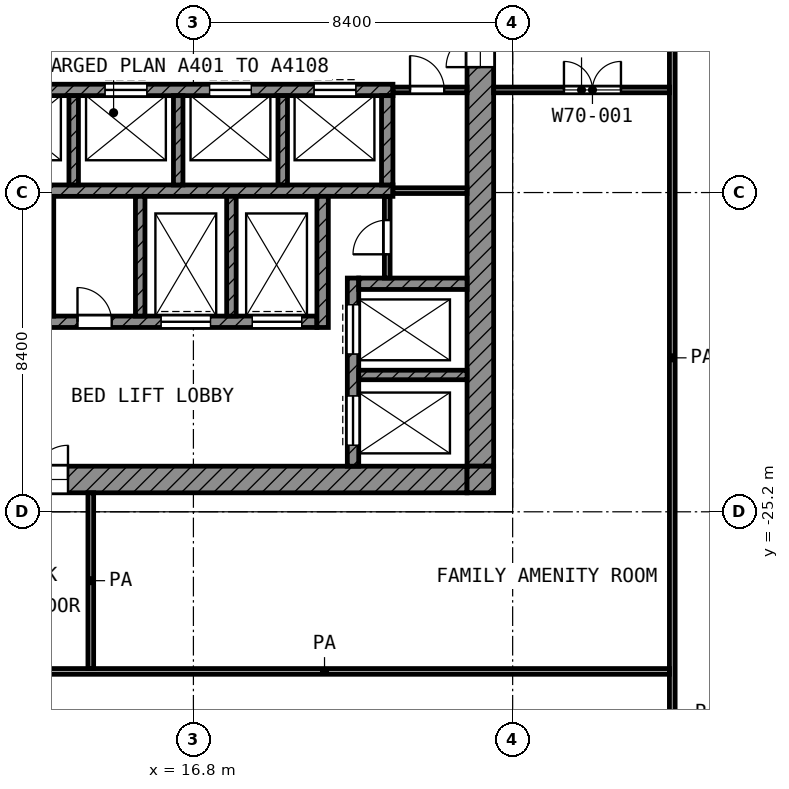
"""IFC4 building model, lengths in metres.
Left out: names, types, materials, properties, quantities, classifications, styles, units other than length and angle.
Written with IfcOpenShell. Run it as: python <this file> out.ifc"""

import sys

from ifc_helpers import new_model, si_unit, direction, frame, frame_2d, origin, place, context, subcontext, project, spatial, rectangle, extrude, element, fill, save


model = new_model("IFC4")
c1 = context("Model", 3, precision=1e-05, world=origin(), true_north=direction((0.0, 1.0)))
c2 = subcontext(c1, "Body", "Model", "MODEL_VIEW")
j1 = project(units=[si_unit("LENGTHUNIT", "METRE"), si_unit("PLANEANGLEUNIT", "RADIAN")], contexts=[c1])
p1 = place(None, origin())
s1 = spatial("IfcSite", under=j1, at=p1, CompositionType="ELEMENT")
p2 = place(p1, origin())
s2 = spatial("IfcBuilding", under=s1, at=p2, CompositionType="ELEMENT")
p3 = place(p2, frame((0.0, 0.0, 323.8)))
s3 = spatial("IfcBuildingStorey", under=s2, at=p3, CompositionType="ELEMENT", Elevation=323.8)
p4 = place(p3, frame((24.35, -24.0, 0.0), z_axis=(0.0, 0.0, 1.0), x_axis=(0.0, 1.0, 0.0)))
e1 = element("IfcWall", 1, at=p4, inside=s3, PredefinedType="SHEAR", context=c2, shape_type="SweptSolid", body=[
    extrude(rectangle(XDim=18.6, YDim=0.7, at=frame_2d((9.3, 0.0))), origin(), (0.0, 0.0, 1.0), 3.6),
])
p5 = place(p4, frame((10.5, 0.0, 0.0)))
e2 = element("IfcOpeningElement", 2, at=p5, cuts=e1, PredefinedType="OPENING", context=c2, shape_type="SweptSolid", body=[
    extrude(rectangle(XDim=1.8, YDim=2.1, at=frame_2d((0.9, 1.05))), frame((0.0, 0.36, 0.0), z_axis=(0.0, -1.0, 0.0), x_axis=(1.0, 0.0, 0.0)), (0.0, 0.0, 1.0), 0.72),
])
p6 = place(p3, frame((5.4, -24.35, 0.0), z_axis=(0.0, 0.0, 1.0), x_axis=(1.0, 0.0, 0.0)))
e3 = element("IfcWall", 3, at=p6, inside=s3, PredefinedType="SHEAR", context=c2, shape_type="SweptSolid", body=[
    extrude(rectangle(XDim=18.6, YDim=0.7, at=frame_2d((9.3, 0.0))), origin(), (0.0, 0.0, 1.0), 3.6),
])
p7 = place(p6, frame((6.3, 0.0, 0.0)))
e4 = element("IfcOpeningElement", 4, at=p7, cuts=e3, PredefinedType="OPENING", context=c2, shape_type="SweptSolid", body=[
    extrude(rectangle(XDim=1.8, YDim=2.1, at=frame_2d((0.9, 1.05))), frame((0.0, 0.36, 0.0), z_axis=(0.0, -1.0, 0.0), x_axis=(1.0, 0.0, 0.0)), (0.0, 0.0, 1.0), 0.72),
])
p8 = place(p3, frame((24.35, -24.7, 0.0), z_axis=(0.0, 0.0, 1.0), x_axis=(0.0, 1.0, 0.0)))
e5 = element("IfcWall", 5, at=p8, inside=s3, PredefinedType="SHEAR", context=c2, shape_type="SweptSolid", body=[
    extrude(rectangle(XDim=0.7, YDim=0.7, at=frame_2d((0.35, 0.0))), origin(), (0.0, 0.0, 1.0), 3.6),
])
p9 = place(p3, frame((5.4, -14.1, 0.0), z_axis=(0.0, 0.0, 1.0), x_axis=(1.0, 0.0, 0.0)))
e6 = element("IfcWall", 6, at=p9, inside=s3, PredefinedType="SHEAR", context=c2, shape_type="SweptSolid", body=[
    extrude(rectangle(XDim=16.65, YDim=0.3, at=frame_2d((8.325, 0.0))), origin(), (0.0, 0.0, 1.0), 3.6),
])
p10 = place(p9, frame((6.325, 0.0, 0.0)))
e7 = element("IfcOpeningElement", 7, at=p10, cuts=e6, PredefinedType="OPENING", context=c2, shape_type="SweptSolid", body=[
    extrude(rectangle(XDim=1.1, YDim=2.1, at=frame_2d((0.55, 1.05))), frame((0.0, 0.16, 0.0), z_axis=(0.0, -1.0, 0.0), x_axis=(1.0, 0.0, 0.0)), (0.0, 0.0, 1.0), 0.32),
])
p11 = place(p9, frame((9.075, 0.0, 0.0)))
e8 = element("IfcOpeningElement", 8, at=p11, cuts=e6, PredefinedType="OPENING", context=c2, shape_type="SweptSolid", body=[
    extrude(rectangle(XDim=1.1, YDim=2.1, at=frame_2d((0.55, 1.05))), frame((0.0, 0.16, 0.0), z_axis=(0.0, -1.0, 0.0), x_axis=(1.0, 0.0, 0.0)), (0.0, 0.0, 1.0), 0.32),
])
p12 = place(p9, frame((11.825, 0.0, 0.0)))
e9 = element("IfcOpeningElement", 9, at=p12, cuts=e6, PredefinedType="OPENING", context=c2, shape_type="SweptSolid", body=[
    extrude(rectangle(XDim=1.1, YDim=2.1, at=frame_2d((0.55, 1.05))), frame((0.0, 0.16, 0.0), z_axis=(0.0, -1.0, 0.0), x_axis=(1.0, 0.0, 0.0)), (0.0, 0.0, 1.0), 0.32),
])
p13 = place(p9, frame((14.575, 0.0, 0.0)))
e10 = element("IfcOpeningElement", 10, at=p13, cuts=e6, PredefinedType="OPENING", context=c2, shape_type="SweptSolid", body=[
    extrude(rectangle(XDim=1.1, YDim=2.1, at=frame_2d((0.55, 1.05))), frame((0.0, 0.16, 0.0), z_axis=(0.0, -1.0, 0.0), x_axis=(1.0, 0.0, 0.0)), (0.0, 0.0, 1.0), 0.32),
])
p14 = place(p9, frame((2.3, 0.0, 0.0)))
e11 = element("IfcOpeningElement", 11, at=p14, cuts=e6, PredefinedType="OPENING", context=c2, shape_type="SweptSolid", body=[
    extrude(rectangle(XDim=0.9, YDim=2.1, at=frame_2d((0.45, 1.05))), frame((0.0, 0.16, 0.0), z_axis=(0.0, -1.0, 0.0), x_axis=(1.0, 0.0, 0.0)), (0.0, 0.0, 1.0), 0.32),
])
p15 = place(p3, frame((5.4, -16.75, 0.0), z_axis=(0.0, 0.0, 1.0), x_axis=(1.0, 0.0, 0.0)))
e12 = element("IfcWall", 12, at=p15, inside=s3, PredefinedType="SHEAR", context=c2, shape_type="SweptSolid", body=[
    extrude(rectangle(XDim=16.65, YDim=0.3, at=frame_2d((8.325, 0.0))), origin(), (0.0, 0.0, 1.0), 3.6),
])
p16 = place(p3, frame((5.4, -20.2, 0.0), z_axis=(0.0, 0.0, 1.0), x_axis=(1.0, 0.0, 0.0)))
e13 = element("IfcWall", 13, at=p16, inside=s3, PredefinedType="SHEAR", context=c2, shape_type="SweptSolid", body=[
    extrude(rectangle(XDim=14.65, YDim=0.3, at=frame_2d((7.325, 0.0))), origin(), (0.0, 0.0, 1.0), 3.6),
])
p17 = place(p16, frame((10.55, 0.0, 0.0)))
e14 = element("IfcOpeningElement", 14, at=p17, cuts=e13, PredefinedType="OPENING", context=c2, shape_type="SweptSolid", body=[
    extrude(rectangle(XDim=1.3, YDim=2.1, at=frame_2d((0.65, 1.05))), frame((0.0, 0.16, 0.0), z_axis=(0.0, -1.0, 0.0), x_axis=(1.0, 0.0, 0.0)), (0.0, 0.0, 1.0), 0.32),
])
p18 = place(p16, frame((12.95, 0.0, 0.0)))
e15 = element("IfcOpeningElement", 15, at=p18, cuts=e13, PredefinedType="OPENING", context=c2, shape_type="SweptSolid", body=[
    extrude(rectangle(XDim=1.3, YDim=2.1, at=frame_2d((0.65, 1.05))), frame((0.0, 0.16, 0.0), z_axis=(0.0, -1.0, 0.0), x_axis=(1.0, 0.0, 0.0)), (0.0, 0.0, 1.0), 0.32),
])
p19 = place(p16, frame((0.55, 0.0, 0.0)))
e16 = element("IfcOpeningElement", 16, at=p19, cuts=e13, PredefinedType="OPENING", context=c2, shape_type="SweptSolid", body=[
    extrude(rectangle(XDim=1.3, YDim=2.1, at=frame_2d((0.65, 1.05))), frame((0.0, 0.16, 0.0), z_axis=(0.0, -1.0, 0.0), x_axis=(1.0, 0.0, 0.0)), (0.0, 0.0, 1.0), 0.32),
])
p20 = place(p16, frame((2.95, 0.0, 0.0)))
e17 = element("IfcOpeningElement", 17, at=p20, cuts=e13, PredefinedType="OPENING", context=c2, shape_type="SweptSolid", body=[
    extrude(rectangle(XDim=1.3, YDim=2.1, at=frame_2d((0.65, 1.05))), frame((0.0, 0.16, 0.0), z_axis=(0.0, -1.0, 0.0), x_axis=(1.0, 0.0, 0.0)), (0.0, 0.0, 1.0), 0.32),
])
p21 = place(p16, frame((5.95, 0.0, 0.0)))
e18 = element("IfcOpeningElement", 18, at=p21, cuts=e13, PredefinedType="OPENING", context=c2, shape_type="SweptSolid", body=[
    extrude(rectangle(XDim=0.9, YDim=2.1, at=frame_2d((0.45, 1.05))), frame((0.0, 0.16, 0.0), z_axis=(0.0, -1.0, 0.0), x_axis=(1.0, 0.0, 0.0)), (0.0, 0.0, 1.0), 0.32),
])
p22 = place(p16, frame((8.35, 0.0, 0.0)))
e19 = element("IfcOpeningElement", 19, at=p22, cuts=e13, PredefinedType="OPENING", context=c2, shape_type="SweptSolid", body=[
    extrude(rectangle(XDim=0.9, YDim=2.1, at=frame_2d((0.45, 1.05))), frame((0.0, 0.16, 0.0), z_axis=(0.0, -1.0, 0.0), x_axis=(1.0, 0.0, 0.0)), (0.0, 0.0, 1.0), 0.32),
])
p23 = place(p3, frame((20.2, -20.35, 0.0), z_axis=(0.0, 0.0, 1.0), x_axis=(0.0, 1.0, 0.0)))
e20 = element("IfcWall", 20, at=p23, inside=s3, PredefinedType="SHEAR", context=c2, shape_type="SweptSolid", body=[
    extrude(rectangle(XDim=3.45, YDim=0.3, at=frame_2d((1.725, 0.0))), origin(), (0.0, 0.0, 1.0), 3.6),
])
p24 = place(p3, frame((21.9, -16.6, 0.0), z_axis=(0.0, 0.0, 1.0), x_axis=(0.0, 1.0, 0.0)))
e21 = element("IfcWall", 21, at=p24, inside=s3, PredefinedType="SHEAR", context=c2, shape_type="SweptSolid", body=[
    extrude(rectangle(XDim=2.35, YDim=0.3, at=frame_2d((1.175, 0.0))), origin(), (0.0, 0.0, 1.0), 3.6),
])
p25 = place(p3, frame((21.15, -19.2, 0.0), z_axis=(0.0, 0.0, 1.0), x_axis=(1.0, 0.0, 0.0)))
e22 = element("IfcWall", 22, at=p25, inside=s3, PredefinedType="SHEAR", context=c2, shape_type="SweptSolid", body=[
    extrude(rectangle(XDim=2.85, YDim=0.3, at=frame_2d((1.425, 0.0))), origin(), (0.0, 0.0, 1.0), 3.6),
])
p26 = place(p3, frame((21.0, -24.0, 0.0), z_axis=(0.0, 0.0, 1.0), x_axis=(0.0, 1.0, 0.0)))
e23 = element("IfcWall", 23, at=p26, inside=s3, PredefinedType="SHEAR", context=c2, shape_type="SweptSolid", body=[
    extrude(rectangle(XDim=4.95, YDim=0.3, at=frame_2d((2.475, 0.0))), origin(), (0.0, 0.0, 1.0), 3.6),
])
p27 = place(p26, frame((2.95, 0.0, 0.0)))
e24 = element("IfcOpeningElement", 24, at=p27, cuts=e23, PredefinedType="OPENING", context=c2, shape_type="SweptSolid", body=[
    extrude(rectangle(XDim=1.3, YDim=2.1, at=frame_2d((0.65, 1.05))), frame((0.0, 0.16, 0.0), z_axis=(0.0, -1.0, 0.0), x_axis=(1.0, 0.0, 0.0)), (0.0, 0.0, 1.0), 0.32),
])
p28 = place(p26, frame((0.55, 0.0, 0.0)))
e25 = element("IfcOpeningElement", 25, at=p28, cuts=e23, PredefinedType="OPENING", context=c2, shape_type="SweptSolid", body=[
    extrude(rectangle(XDim=1.3, YDim=2.1, at=frame_2d((0.65, 1.05))), frame((0.0, 0.16, 0.0), z_axis=(0.0, -1.0, 0.0), x_axis=(1.0, 0.0, 0.0)), (0.0, 0.0, 1.0), 0.32),
])
p29 = place(p3, frame((21.15, -21.6, 0.0), z_axis=(0.0, 0.0, 1.0), x_axis=(1.0, 0.0, 0.0)))
e26 = element("IfcWall", 26, at=p29, inside=s3, PredefinedType="SHEAR", context=c2, shape_type="SweptSolid", body=[
    extrude(rectangle(XDim=2.85, YDim=0.25, at=frame_2d((1.425, 0.0))), origin(), (0.0, 0.0, 1.0), 3.6),
])
for number, where, z_axis, x_axis in (
    (27, (13.0, -20.05, 0.0), (0.0, 0.0, 1.0), (0.0, 1.0, 0.0)),
    (28, (15.4, -20.05, 0.0), (0.0, 0.0, 1.0), (0.0, 1.0, 0.0)),
    (29, (17.8, -20.05, 0.0), (0.0, 0.0, 1.0), (0.0, 1.0, 0.0)),
):
    element("IfcWall", number, at=place(p3, frame(where, z_axis=z_axis, x_axis=x_axis)), inside=s3, PredefinedType="SHEAR", context=c2, shape_type="SweptSolid", body=[
        extrude(rectangle(XDim=3.15, YDim=0.25, at=frame_2d((1.575, 0.0))), origin(), (0.0, 0.0, 1.0), 3.6),
    ])
for number, where, z_axis, x_axis in (
    (30, (13.65, -16.6, 0.0), (0.0, 0.0, 1.0), (0.0, 1.0, 0.0)),
    (31, (16.4, -16.6, 0.0), (0.0, 0.0, 1.0), (0.0, 1.0, 0.0)),
    (32, (19.15, -16.6, 0.0), (0.0, 0.0, 1.0), (0.0, 1.0, 0.0)),
):
    element("IfcWall", number, at=place(p3, frame(where, z_axis=z_axis, x_axis=x_axis)), inside=s3, PredefinedType="SHEAR", context=c2, shape_type="SweptSolid", body=[
        extrude(rectangle(XDim=2.35, YDim=0.25, at=frame_2d((1.175, 0.0))), origin(), (0.0, 0.0, 1.0), 3.6),
    ])
p30 = place(p3, frame((21.9, -19.05, 0.0), z_axis=(0.0, 0.0, 1.0), x_axis=(0.0, 1.0, 0.0)))
e33 = element("IfcWall", 33, at=p30, inside=s3, PredefinedType="PARTITIONING", context=c2, shape_type="SweptSolid", body=[
    extrude(rectangle(XDim=2.15, YDim=0.15, at=frame_2d((1.075, 0.0))), origin(), (0.0, 0.0, 1.0), 3.6),
])
p31 = place(p30, frame((0.625, 0.0, 0.0)))
e34 = element("IfcOpeningElement", 34, at=p31, cuts=e33, PredefinedType="OPENING", context=c2, shape_type="SweptSolid", body=[
    extrude(rectangle(XDim=0.9, YDim=2.1, at=frame_2d((0.45, 1.05))), frame((0.0, 0.085, 0.0), z_axis=(0.0, -1.0, 0.0), x_axis=(1.0, 0.0, 0.0)), (0.0, 0.0, 1.0), 0.17),
])
p32 = place(p3, frame((22.05, -16.75, 0.0), z_axis=(0.0, 0.0, 1.0), x_axis=(1.0, 0.0, 0.0)))
e35 = element("IfcWall", 35, at=p32, inside=s3, PredefinedType="PARTITIONING", context=c2, shape_type="SweptSolid", body=[
    extrude(rectangle(XDim=1.95, YDim=0.15, at=frame_2d((0.975, 0.0))), origin(), (0.0, 0.0, 1.0), 3.6),
])
p33 = place(p3, frame((22.05, -14.1, 0.0), z_axis=(0.0, 0.0, 1.0), x_axis=(1.0, 0.0, 0.0)))
e36 = element("IfcWall", 36, at=p33, inside=s3, PredefinedType="PARTITIONING", context=c2, shape_type="SweptSolid", body=[
    extrude(rectangle(XDim=1.95, YDim=0.15, at=frame_2d((0.975, 0.0))), origin(), (0.0, 0.0, 1.0), 3.6),
])
p34 = place(p33, frame((0.45, 0.0, 0.0)))
e37 = element("IfcOpeningElement", 37, at=p34, cuts=e36, PredefinedType="OPENING", context=c2, shape_type="SweptSolid", body=[
    extrude(rectangle(XDim=0.9, YDim=2.1, at=frame_2d((0.45, 1.05))), frame((0.0, 0.085, 0.0), z_axis=(0.0, -1.0, 0.0), x_axis=(1.0, 0.0, 0.0)), (0.0, 0.0, 1.0), 0.17),
])
p35 = place(p3, frame((11.175, -29.4, 0.0), z_axis=(0.0, 0.0, 1.0), x_axis=(1.0, 0.0, 0.0)))
e38 = element("IfcWall", 38, at=p35, inside=s3, PredefinedType="PARTITIONING", context=c2, shape_type="SweptSolid", body=[
    extrude(rectangle(XDim=18.15, YDim=0.15, at=frame_2d((9.075, 0.0))), origin(), (0.0, 0.0, 1.0), 3.6),
])
p36 = place(p3, frame((24.7, -14.1, 0.0), z_axis=(0.0, 0.0, 1.0), x_axis=(1.0, 0.0, 0.0)))
e39 = element("IfcWall", 39, at=p36, inside=s3, PredefinedType="PARTITIONING", context=c2, shape_type="SweptSolid", body=[
    extrude(rectangle(XDim=4.625, YDim=0.15, at=frame_2d((2.312, 0.0))), origin(), (0.0, 0.0, 1.0), 3.6),
])
p37 = place(p36, frame((1.85, 0.0, 0.0)))
e40 = element("IfcOpeningElement", 40, at=p37, cuts=e39, PredefinedType="OPENING", context=c2, shape_type="SweptSolid", body=[
    extrude(rectangle(XDim=1.5, YDim=2.1, at=frame_2d((0.75, 1.05))), frame((0.0, 0.085, 0.0), z_axis=(0.0, -1.0, 0.0), x_axis=(1.0, 0.0, 0.0)), (0.0, 0.0, 1.0), 0.17),
])
p38 = place(p3, frame((14.1, -29.325, 0.0), z_axis=(0.0, 0.0, 1.0), x_axis=(0.0, 1.0, 0.0)))
e41 = element("IfcWall", 41, at=p38, inside=s3, PredefinedType="PARTITIONING", context=c2, shape_type="SweptSolid", body=[
    extrude(rectangle(XDim=4.625, YDim=0.15, at=frame_2d((2.312, 0.0))), origin(), (0.0, 0.0, 1.0), 3.6),
])
p39 = place(p3, frame((29.4, -31.198, 0.0), z_axis=(0.0, 0.0, 1.0), x_axis=(0.0, 1.0, 0.0)))
e42 = element("IfcWall", 42, at=p39, inside=s3, PredefinedType="PARTITIONING", context=c2, shape_type="SweptSolid", body=[
    extrude(rectangle(XDim=20.098, YDim=0.15, at=frame_2d((10.049, 0.0))), origin(), (0.0, 0.0, 1.0), 3.6),
])
p40 = place(p11, origin())
e43 = element("IfcDoor", 43, at=p40, inside=s3, OperationType="DOUBLE_DOOR_SLIDING", PredefinedType="DOOR", context=c2, shape_type="SweptSolid", body=[
    extrude(rectangle(XDim=1.1, YDim=2.1, at=frame_2d((0.55, 1.05))), frame((0.0, 0.025, 0.0), z_axis=(0.0, -1.0, 0.0), x_axis=(1.0, 0.0, 0.0)), (0.0, 0.0, 1.0), 0.05),
])
fill(e8, e43)
p41 = place(p12, origin())
e44 = element("IfcDoor", 44, at=p41, inside=s3, OperationType="DOUBLE_DOOR_SLIDING", PredefinedType="DOOR", context=c2, shape_type="SweptSolid", body=[
    extrude(rectangle(XDim=1.1, YDim=2.1, at=frame_2d((0.55, 1.05))), frame((0.0, 0.025, 0.0), z_axis=(0.0, -1.0, 0.0), x_axis=(1.0, 0.0, 0.0)), (0.0, 0.0, 1.0), 0.05),
])
fill(e9, e44)
p42 = place(p13, origin())
e45 = element("IfcDoor", 45, at=p42, inside=s3, OperationType="DOUBLE_DOOR_SLIDING", PredefinedType="DOOR", context=c2, shape_type="SweptSolid", body=[
    extrude(rectangle(XDim=1.1, YDim=2.1, at=frame_2d((0.55, 1.05))), frame((0.0, 0.025, 0.0), z_axis=(0.0, -1.0, 0.0), x_axis=(1.0, 0.0, 0.0)), (0.0, 0.0, 1.0), 0.05),
])
fill(e10, e45)
p43 = place(p27, origin())
e46 = element("IfcDoor", 46, at=p43, inside=s3, OperationType="DOUBLE_DOOR_SLIDING", PredefinedType="DOOR", context=c2, shape_type="SweptSolid", body=[
    extrude(rectangle(XDim=1.3, YDim=2.1, at=frame_2d((0.65, 1.05))), frame((0.0, 0.025, 0.0), z_axis=(0.0, -1.0, 0.0), x_axis=(1.0, 0.0, 0.0)), (0.0, 0.0, 1.0), 0.05),
])
fill(e24, e46)
p44 = place(p28, origin())
e47 = element("IfcDoor", 47, at=p44, inside=s3, OperationType="DOUBLE_DOOR_SLIDING", PredefinedType="DOOR", context=c2, shape_type="SweptSolid", body=[
    extrude(rectangle(XDim=1.3, YDim=2.1, at=frame_2d((0.65, 1.05))), frame((0.0, 0.025, 0.0), z_axis=(0.0, -1.0, 0.0), x_axis=(1.0, 0.0, 0.0)), (0.0, 0.0, 1.0), 0.05),
])
fill(e25, e47)
p45 = place(p17, origin())
e48 = element("IfcDoor", 48, at=p45, inside=s3, OperationType="DOUBLE_DOOR_SLIDING", PredefinedType="DOOR", context=c2, shape_type="SweptSolid", body=[
    extrude(rectangle(XDim=1.3, YDim=2.1, at=frame_2d((0.65, 1.05))), frame((0.0, 0.025, 0.0), z_axis=(0.0, -1.0, 0.0), x_axis=(1.0, 0.0, 0.0)), (0.0, 0.0, 1.0), 0.05),
])
fill(e14, e48)
p46 = place(p18, origin())
e49 = element("IfcDoor", 49, at=p46, inside=s3, OperationType="DOUBLE_DOOR_SLIDING", PredefinedType="DOOR", context=c2, shape_type="SweptSolid", body=[
    extrude(rectangle(XDim=1.3, YDim=2.1, at=frame_2d((0.65, 1.05))), frame((0.0, 0.025, 0.0), z_axis=(0.0, -1.0, 0.0), x_axis=(1.0, 0.0, 0.0)), (0.0, 0.0, 1.0), 0.05),
])
fill(e15, e49)
p47 = place(p5, origin())
e50 = element("IfcDoor", 50, at=p47, inside=s3, OperationType="DOUBLE_DOOR_SINGLE_SWING", PredefinedType="DOOR", context=c2, shape_type="SweptSolid", body=[
    extrude(rectangle(XDim=1.8, YDim=2.1, at=frame_2d((0.9, 1.05))), frame((0.0, 0.025, 0.0), z_axis=(0.0, -1.0, 0.0), x_axis=(1.0, 0.0, 0.0)), (0.0, 0.0, 1.0), 0.05),
])
fill(e2, e50)
p48 = place(p7, origin())
e51 = element("IfcDoor", 51, at=p48, inside=s3, OperationType="DOUBLE_DOOR_SINGLE_SWING", PredefinedType="DOOR", context=c2, shape_type="SweptSolid", body=[
    extrude(rectangle(XDim=1.8, YDim=2.1, at=frame_2d((0.9, 1.05))), frame((0.0, 0.025, 0.0), z_axis=(0.0, -1.0, 0.0), x_axis=(1.0, 0.0, 0.0)), (0.0, 0.0, 1.0), 0.05),
])
fill(e4, e51)
p49 = place(p34, origin())
e52 = element("IfcDoor", 52, at=p49, inside=s3, OperationType="SINGLE_SWING_LEFT", PredefinedType="DOOR", context=c2, shape_type="SweptSolid", body=[
    extrude(rectangle(XDim=0.9, YDim=2.1, at=frame_2d((0.45, 1.05))), frame((0.0, 0.025, 0.0), z_axis=(0.0, -1.0, 0.0), x_axis=(1.0, 0.0, 0.0)), (0.0, 0.0, 1.0), 0.05),
])
fill(e37, e52)
p50 = place(p31, origin())
e53 = element("IfcDoor", 53, at=p50, inside=s3, OperationType="SINGLE_SWING_LEFT", PredefinedType="DOOR", context=c2, shape_type="SweptSolid", body=[
    extrude(rectangle(XDim=0.9, YDim=2.1, at=frame_2d((0.45, 1.05))), frame((0.0, 0.025, 0.0), z_axis=(0.0, -1.0, 0.0), x_axis=(1.0, 0.0, 0.0)), (0.0, 0.0, 1.0), 0.05),
])
fill(e34, e53)
p51 = place(p22, origin())
e54 = element("IfcDoor", 54, at=p51, inside=s3, OperationType="SINGLE_SWING_LEFT", PredefinedType="DOOR", context=c2, shape_type="SweptSolid", body=[
    extrude(rectangle(XDim=0.9, YDim=2.1, at=frame_2d((0.45, 1.05))), frame((0.0, 0.025, 0.0), z_axis=(0.0, -1.0, 0.0), x_axis=(1.0, 0.0, 0.0)), (0.0, 0.0, 1.0), 0.05),
])
fill(e19, e54)
p52 = place(p37, origin())
e55 = element("IfcDoor", 55, at=p52, inside=s3, OperationType="DOUBLE_DOOR_SINGLE_SWING", PredefinedType="DOOR", context=c2, shape_type="SweptSolid", body=[
    extrude(rectangle(XDim=1.5, YDim=2.1, at=frame_2d((0.75, 1.05))), frame((0.0, 0.025, 0.0), z_axis=(0.0, -1.0, 0.0), x_axis=(1.0, 0.0, 0.0)), (0.0, 0.0, 1.0), 0.05),
])
fill(e40, e55)
save(model, sys.argv[1])
